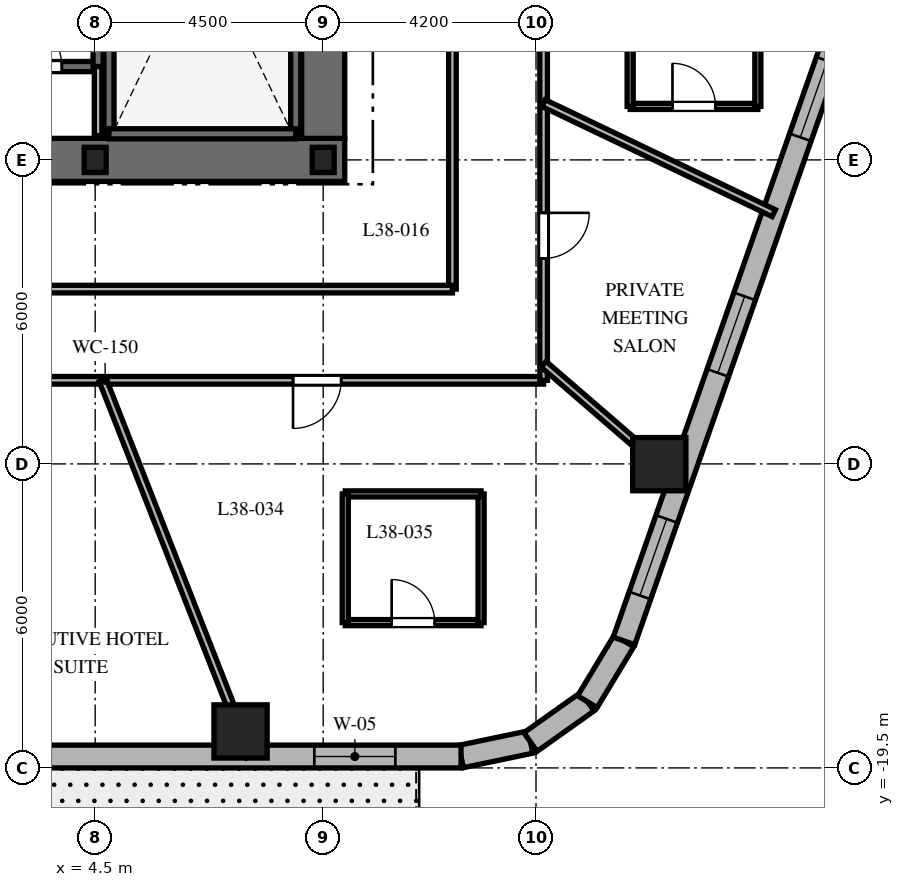
"""IFC4 building model, lengths in metres.
Left out: names, types, materials, properties, quantities, classifications, styles, units other than length and angle.
Written with IfcOpenShell. Run it as: python <this file> out.ifc"""

import sys

from ifc_helpers import new_model, si_unit, direction, frame, frame_2d, origin, origin_2d, place, context, subcontext, project, spatial, rectangle, i_section, extrude, element, fill, save


model = new_model("IFC4")
c1 = context("Model", 3, precision=1e-05, world=origin(), true_north=direction((0.0, 1.0)))
c2 = subcontext(c1, "Body", "Model", "MODEL_VIEW")
j1 = project(units=[si_unit("LENGTHUNIT", "METRE"), si_unit("PLANEANGLEUNIT", "RADIAN")], contexts=[c1])
p1 = place(None, origin())
s1 = spatial("IfcSite", under=j1, at=p1, CompositionType="ELEMENT")
p2 = place(p1, origin())
s2 = spatial("IfcBuilding", under=s1, at=p2, CompositionType="ELEMENT")
p3 = place(p2, frame((0.0, 0.0, 155.4)))
s3 = spatial("IfcBuildingStorey", under=s2, at=p3, CompositionType="ELEMENT", Elevation=155.4)
p4 = place(p3, frame((-9.425, -7.5, 0.0), z_axis=(0.0, 0.0, 1.0), x_axis=(1.0, 0.0, 0.0)))
e1 = element("IfcWall", 1, at=p4, inside=s3, PredefinedType="SHEAR", context=c2, shape_type="SweptSolid", body=[
    extrude(rectangle(XDim=18.85, YDim=0.85, at=frame_2d((9.425, 0.0))), origin(), (0.0, 0.0, 1.0), 3.7),
])
p5 = place(p4, frame((9.475, 0.0, 0.0)))
e2 = element("IfcOpeningElement", 2, at=p5, cuts=e1, PredefinedType="OPENING", context=c2, shape_type="SweptSolid", body=[
    extrude(rectangle(XDim=1.0, YDim=2.15, at=frame_2d((0.5, 1.075))), frame((0.0, 0.435, 0.0), z_axis=(0.0, -1.0, 0.0), x_axis=(1.0, 0.0, 0.0)), (0.0, 0.0, 1.0), 0.87),
])
p6 = place(p3, frame((9.0, -7.075, 0.0), z_axis=(0.0, 0.0, 1.0), x_axis=(0.0, 1.0, 0.0)))
e3 = element("IfcWall", 3, at=p6, inside=s3, PredefinedType="SHEAR", context=c2, shape_type="SweptSolid", body=[
    extrude(rectangle(XDim=14.15, YDim=0.85, at=frame_2d((7.075, 0.0))), origin(), (0.0, 0.0, 1.0), 3.7),
])
p7 = place(p6, frame((10.2, 0.0, 0.0)))
e4 = element("IfcOpeningElement", 4, at=p7, cuts=e3, PredefinedType="OPENING", context=c2, shape_type="SweptSolid", body=[
    extrude(rectangle(XDim=1.05, YDim=2.15, at=frame_2d((0.525, 1.075))), frame((0.0, 0.435, 0.0), z_axis=(0.0, -1.0, 0.0), x_axis=(1.0, 0.0, 0.0)), (0.0, 0.0, 1.0), 0.87),
])
for number, where, z_axis, x_axis in (
    (5, (4.772, -6.985, 0.0), (0.0, 0.0, 1.0), (0.0, 1.0, 0.0)),
    (6, (8.458, -6.985, 0.0), (0.0, 0.0, 1.0), (0.0, 1.0, 0.0)),
):
    element("IfcWall", number, at=place(p3, frame(where, z_axis=z_axis, x_axis=x_axis)), inside=s3, PredefinedType="SHEAR", context=c2, shape_type="SweptSolid", body=[
        extrude(rectangle(XDim=9.143, YDim=0.2, at=frame_2d((4.572, 0.0))), origin(), (0.0, 0.0, 1.0), 3.7),
    ])
p8 = place(p3, frame((4.772, -6.985, 0.0), z_axis=(0.0, 0.0, 1.0), x_axis=(1.0, 0.0, 0.0)))
e7 = element("IfcWall", 7, at=p8, inside=s3, PredefinedType="SHEAR", context=c2, shape_type="SweptSolid", body=[
    extrude(rectangle(XDim=3.686, YDim=0.2, at=frame_2d((1.843, 0.0))), origin(), (0.0, 0.0, 1.0), 3.7),
])
p9 = place(p3, frame((-4.608, -5.658, 0.0), z_axis=(0.0, 0.0, 1.0), x_axis=(1.0, 0.0, 0.0)))
e8 = element("IfcWall", 8, at=p9, inside=s3, PredefinedType="SHEAR", context=c2, shape_type="SweptSolid", body=[
    extrude(rectangle(XDim=9.166, YDim=0.2, at=frame_2d((4.583, 0.0))), origin(), (0.0, 0.0, 1.0), 3.7),
])
p10 = place(p9, frame((7.45, 0.0, 0.0)))
e9 = element("IfcOpeningElement", 9, at=p10, cuts=e8, PredefinedType="OPENING", context=c2, shape_type="SweptSolid", body=[
    extrude(rectangle(XDim=1.0, YDim=2.15, at=frame_2d((0.5, 1.075))), frame((0.0, 0.11, 0.0), z_axis=(0.0, -1.0, 0.0), x_axis=(1.0, 0.0, 0.0)), (0.0, 0.0, 1.0), 0.22),
])
p11 = place(p3, frame((4.558, -5.658, 0.0), z_axis=(0.0, 0.0, 1.0), x_axis=(0.0, 1.0, 0.0)))
e10 = element("IfcWall", 10, at=p11, inside=s3, PredefinedType="SHEAR", context=c2, shape_type="SweptSolid", body=[
    extrude(rectangle(XDim=3.686, YDim=0.2, at=frame_2d((1.843, 0.0))), origin(), (0.0, 0.0, 1.0), 3.7),
])
for number, where, z_axis, x_axis in (
    (11, (4.5, -7.5, 0.0), (0.0, 0.0, 1.0), (1.0, 0.0, 0.0)),
    (12, (9.0, -7.5, 0.0), (0.0, 0.0, 1.0), (1.0, 0.0, 0.0)),
):
    element("IfcColumn", number, at=place(p3, frame(where, z_axis=z_axis, x_axis=x_axis)), inside=s3, PredefinedType="COLUMN", context=c2, shape_type="SweptSolid", body=[
        extrude(i_section(OverallWidth=0.432, OverallDepth=0.498, WebThickness=0.056, FlangeThickness=0.089, at=origin_2d()), origin(), (0.0, 0.0, 1.0), 3.7),
    ])
for number, where, z_axis, x_axis in (
    (13, (7.369, -18.78, 0.0), (0.0, 0.0, 1.0), (1.0, 0.0, 0.0)),
    (14, (15.633, -13.505, 0.0), (0.0, 0.0, 1.0), (1.0, 0.0, 0.0)),
):
    element("IfcColumn", number, at=place(p3, frame(where, z_axis=z_axis, x_axis=x_axis)), inside=s3, PredefinedType="COLUMN", context=c2, shape_type="SweptSolid", body=[
        extrude(rectangle(XDim=1.05, YDim=1.05, at=origin_2d()), origin(), (0.0, 0.0, 1.0), 3.7),
    ])
p12 = place(p3, frame((11.72, -19.275, 0.0), z_axis=(0.0, 0.0, 1.0), x_axis=(0.97893106758, 0.204191001093, 0.0)))
e15 = element("IfcWall", 15, at=p12, inside=s3, PredefinedType="SOLIDWALL", context=c2, shape_type="SweptSolid", body=[
    extrude(rectangle(XDim=1.4, YDim=0.45, at=frame_2d((0.7, 0.0))), origin(), (0.0, 0.0, 1.0), 3.4),
])
p13 = place(p3, frame((13.091, -18.989, 0.0), z_axis=(0.0, 0.0, 1.0), x_axis=(0.815574637848, 0.578651890258, 0.0)))
e16 = element("IfcWall", 16, at=p13, inside=s3, PredefinedType="SOLIDWALL", context=c2, shape_type="SweptSolid", body=[
    extrude(rectangle(XDim=1.377, YDim=0.45, at=frame_2d((0.688, 0.0))), origin(), (0.0, 0.0, 1.0), 3.4),
])
p14 = place(p3, frame((14.214, -18.192, 0.0), z_axis=(0.0, 0.0, 1.0), x_axis=(0.516340945502, 0.856383108193, 0.0)))
e17 = element("IfcWall", 17, at=p14, inside=s3, PredefinedType="SOLIDWALL", context=c2, shape_type="SweptSolid", body=[
    extrude(rectangle(XDim=1.4, YDim=0.45, at=frame_2d((0.7, 0.0))), origin(), (0.0, 0.0, 1.0), 3.4),
])
p15 = place(p3, frame((-10.108, -19.275, 0.0), z_axis=(0.0, 0.0, 1.0), x_axis=(1.0, 0.0, 0.0)))
e18 = element("IfcWall", 18, at=p15, inside=s3, PredefinedType="SOLIDWALL", context=c2, shape_type="SweptSolid", body=[
    extrude(rectangle(XDim=21.829, YDim=0.45, at=frame_2d((10.915, 0.0))), origin(), (0.0, 0.0, 1.0), 3.4),
])
p16 = place(p15, frame((5.503, 0.0, 0.0)))
e19 = element("IfcOpeningElement", 19, at=p16, cuts=e18, PredefinedType="OPENING", context=c2, shape_type="SweptSolid", body=[
    extrude(rectangle(XDim=1.0, YDim=2.15, at=frame_2d((0.5, 1.075))), frame((0.0, 0.235, 0.0), z_axis=(0.0, -1.0, 0.0), x_axis=(1.0, 0.0, 0.0)), (0.0, 0.0, 1.0), 0.47),
])
p17 = place(p15, frame((1.297, 0.0, 0.8)))
e20 = element("IfcOpeningElement", 20, at=p17, cuts=e18, PredefinedType="OPENING", context=c2, shape_type="SweptSolid", body=[
    extrude(rectangle(XDim=1.6, YDim=1.75, at=frame_2d((0.8, 0.875))), frame((0.0, 0.235, 0.0), z_axis=(0.0, -1.0, 0.0), x_axis=(1.0, 0.0, 0.0)), (0.0, 0.0, 1.0), 0.47),
])
p18 = place(p15, frame((10.115, 0.0, 0.8)))
e21 = element("IfcOpeningElement", 21, at=p18, cuts=e18, PredefinedType="OPENING", context=c2, shape_type="SweptSolid", body=[
    extrude(rectangle(XDim=1.6, YDim=1.75, at=frame_2d((0.8, 0.875))), frame((0.0, 0.235, 0.0), z_axis=(0.0, -1.0, 0.0), x_axis=(1.0, 0.0, 0.0)), (0.0, 0.0, 1.0), 0.47),
])
p19 = place(p15, frame((18.933, 0.0, 0.8)))
e22 = element("IfcOpeningElement", 22, at=p19, cuts=e18, PredefinedType="OPENING", context=c2, shape_type="SweptSolid", body=[
    extrude(rectangle(XDim=1.6, YDim=1.75, at=frame_2d((0.8, 0.875))), frame((0.0, 0.235, 0.0), z_axis=(0.0, -1.0, 0.0), x_axis=(1.0, 0.0, 0.0)), (0.0, 0.0, 1.0), 0.47),
])
p20 = place(p3, frame((14.937, -16.993, 0.0), z_axis=(0.0, 0.0, 1.0), x_axis=(0.330431575061, 0.943829949834, 0.0)))
e23 = element("IfcWall", 23, at=p20, inside=s3, PredefinedType="SOLIDWALL", context=c2, shape_type="SweptSolid", body=[
    extrude(rectangle(XDim=17.689, YDim=0.45, at=frame_2d((8.844, 0.0))), origin(), (0.0, 0.0, 1.0), 3.4),
])
p21 = place(p20, frame((0.95, 0.0, 0.8)))
e24 = element("IfcOpeningElement", 24, at=p21, cuts=e23, PredefinedType="OPENING", context=c2, shape_type="SweptSolid", body=[
    extrude(rectangle(XDim=1.6, YDim=1.75, at=frame_2d((0.8, 0.875))), frame((0.0, 0.235, 0.0), z_axis=(0.0, -1.0, 0.0), x_axis=(1.0, 0.0, 0.0)), (0.0, 0.0, 1.0), 0.47),
])
p22 = place(p20, frame((5.605, 0.0, 0.8)))
e25 = element("IfcOpeningElement", 25, at=p22, cuts=e23, PredefinedType="OPENING", context=c2, shape_type="SweptSolid", body=[
    extrude(rectangle(XDim=1.6, YDim=1.75, at=frame_2d((0.8, 0.875))), frame((0.0, 0.235, 0.0), z_axis=(0.0, -1.0, 0.0), x_axis=(1.0, 0.0, 0.0)), (0.0, 0.0, 1.0), 0.47),
])
p23 = place(p20, frame((10.531, 0.0, 0.8)))
e26 = element("IfcOpeningElement", 26, at=p23, cuts=e23, PredefinedType="OPENING", context=c2, shape_type="SweptSolid", body=[
    extrude(rectangle(XDim=1.6, YDim=1.75, at=frame_2d((0.8, 0.875))), frame((0.0, 0.235, 0.0), z_axis=(0.0, -1.0, 0.0), x_axis=(1.0, 0.0, 0.0)), (0.0, 0.0, 1.0), 0.47),
])
p24 = place(p20, frame((15.084, 0.0, 0.8)))
e27 = element("IfcOpeningElement", 27, at=p24, cuts=e23, PredefinedType="OPENING", context=c2, shape_type="SweptSolid", body=[
    extrude(rectangle(XDim=1.6, YDim=1.75, at=frame_2d((0.8, 0.875))), frame((0.0, 0.235, 0.0), z_axis=(0.0, -1.0, 0.0), x_axis=(1.0, 0.0, 0.0)), (0.0, 0.0, 1.0), 0.47),
])
p25 = place(p3, frame((4.558, -7.02, 0.0), z_axis=(0.0, 0.0, 1.0), x_axis=(0.0, 1.0, 0.0)))
e28 = element("IfcWall", 28, at=p25, inside=s3, PredefinedType="PARTITIONING", context=c2, shape_type="SweptSolid", body=[
    extrude(rectangle(XDim=1.362, YDim=0.15, at=frame_2d((0.681, 0.0))), origin(), (0.0, 0.0, 1.0), 3.4),
])
p26 = place(p3, frame((13.35, -11.85, 0.0), z_axis=(0.0, 0.0, 1.0), x_axis=(-1.0, 0.0, 0.0)))
e29 = element("IfcWall", 29, at=p26, inside=s3, PredefinedType="PARTITIONING", context=c2, shape_type="SweptSolid", body=[
    extrude(rectangle(XDim=26.7, YDim=0.15, at=frame_2d((13.35, 0.0))), origin(), (0.0, 0.0, 1.0), 2.84),
])
p27 = place(p26, frame((20.682, 0.0, 0.0)))
e30 = element("IfcOpeningElement", 30, at=p27, cuts=e29, PredefinedType="OPENING", context=c2, shape_type="SweptSolid", body=[
    extrude(rectangle(XDim=0.95, YDim=2.03, at=frame_2d((0.475, 1.015))), frame((0.0, 0.085, 0.0), z_axis=(0.0, -1.0, 0.0), x_axis=(1.0, 0.0, 0.0)), (0.0, 0.0, 1.0), 0.17),
])
p28 = place(p26, frame((12.362, 0.0, 0.0)))
e31 = element("IfcOpeningElement", 31, at=p28, cuts=e29, PredefinedType="OPENING", context=c2, shape_type="SweptSolid", body=[
    extrude(rectangle(XDim=0.95, YDim=2.03, at=frame_2d((0.475, 1.015))), frame((0.0, 0.085, 0.0), z_axis=(0.0, -1.0, 0.0), x_axis=(1.0, 0.0, 0.0)), (0.0, 0.0, 1.0), 0.17),
])
p29 = place(p26, frame((3.995, 0.0, 0.0)))
e32 = element("IfcOpeningElement", 32, at=p29, cuts=e29, PredefinedType="OPENING", context=c2, shape_type="SweptSolid", body=[
    extrude(rectangle(XDim=0.95, YDim=2.03, at=frame_2d((0.475, 1.015))), frame((0.0, 0.085, 0.0), z_axis=(0.0, -1.0, 0.0), x_axis=(1.0, 0.0, 0.0)), (0.0, 0.0, 1.0), 0.17),
])
p30 = place(p3, frame((13.35, 11.85, 0.0), z_axis=(0.0, 0.0, 1.0), x_axis=(0.0, -1.0, 0.0)))
e33 = element("IfcWall", 33, at=p30, inside=s3, PredefinedType="PARTITIONING", context=c2, shape_type="SweptSolid", body=[
    extrude(rectangle(XDim=23.7, YDim=0.15, at=frame_2d((11.85, 0.0))), origin(), (0.0, 0.0, 1.0), 2.84),
])
p31 = place(p30, frame((3.765, 0.0, 0.0)))
e34 = element("IfcOpeningElement", 34, at=p31, cuts=e33, PredefinedType="OPENING", context=c2, shape_type="SweptSolid", body=[
    extrude(rectangle(XDim=0.9, YDim=2.03, at=frame_2d((0.45, 1.015))), frame((0.0, 0.085, 0.0), z_axis=(0.0, -1.0, 0.0), x_axis=(1.0, 0.0, 0.0)), (0.0, 0.0, 1.0), 0.17),
])
p32 = place(p30, frame((20.395, 0.0, 0.0)))
e35 = element("IfcOpeningElement", 35, at=p32, cuts=e33, PredefinedType="OPENING", context=c2, shape_type="SweptSolid", body=[
    extrude(rectangle(XDim=0.9, YDim=2.03, at=frame_2d((0.45, 1.015))), frame((0.0, 0.085, 0.0), z_axis=(0.0, -1.0, 0.0), x_axis=(1.0, 0.0, 0.0)), (0.0, 0.0, 1.0), 0.17),
])
p33 = place(p30, frame((15.787, 0.0, 0.0)))
e36 = element("IfcOpeningElement", 36, at=p33, cuts=e33, PredefinedType="OPENING", context=c2, shape_type="SweptSolid", body=[
    extrude(rectangle(XDim=0.95, YDim=2.03, at=frame_2d((0.475, 1.015))), frame((0.0, 0.085, 0.0), z_axis=(0.0, -1.0, 0.0), x_axis=(1.0, 0.0, 0.0)), (0.0, 0.0, 1.0), 0.17),
])
p34 = place(p30, frame((10.751, 0.0, 0.0)))
e37 = element("IfcOpeningElement", 37, at=p34, cuts=e33, PredefinedType="OPENING", context=c2, shape_type="SweptSolid", body=[
    extrude(rectangle(XDim=0.95, YDim=2.03, at=frame_2d((0.475, 1.015))), frame((0.0, 0.085, 0.0), z_axis=(0.0, -1.0, 0.0), x_axis=(1.0, 0.0, 0.0)), (0.0, 0.0, 1.0), 0.17),
])
p35 = place(p3, frame((11.55, -10.05, 0.0), z_axis=(0.0, 0.0, 1.0), x_axis=(0.0, 1.0, 0.0)))
e38 = element("IfcWall", 38, at=p35, inside=s3, PredefinedType="PARTITIONING", context=c2, shape_type="SweptSolid", body=[
    extrude(rectangle(XDim=12.75, YDim=0.15, at=frame_2d((6.375, 0.0))), origin(), (0.0, 0.0, 1.0), 2.84),
])
p36 = place(p35, frame((5.95, 0.0, 0.0)))
e39 = element("IfcOpeningElement", 39, at=p36, cuts=e38, PredefinedType="OPENING", context=c2, shape_type="SweptSolid", body=[
    extrude(rectangle(XDim=0.85, YDim=2.03, at=frame_2d((0.425, 1.015))), frame((0.0, 0.085, 0.0), z_axis=(0.0, -1.0, 0.0), x_axis=(1.0, 0.0, 0.0)), (0.0, 0.0, 1.0), 0.17),
])
p37 = place(p3, frame((1.9, -10.05, 0.0), z_axis=(0.0, 0.0, 1.0), x_axis=(1.0, 0.0, 0.0)))
e40 = element("IfcWall", 40, at=p37, inside=s3, PredefinedType="PARTITIONING", context=c2, shape_type="SweptSolid", body=[
    extrude(rectangle(XDim=9.65, YDim=0.15, at=frame_2d((4.825, 0.0))), origin(), (0.0, 0.0, 1.0), 2.84),
])
p38 = place(p3, frame((4.65, -11.85, 0.0), z_axis=(0.0, 0.0, 1.0), x_axis=(0.365265947993, -0.930903210456, 0.0)))
e41 = element("IfcWall", 41, at=p38, inside=s3, PredefinedType="PARTITIONING", context=c2, shape_type="SweptSolid", body=[
    extrude(rectangle(XDim=7.976, YDim=0.15, at=frame_2d((3.988, 0.0))), origin(), (0.0, 0.0, 1.0), 2.64),
])
p39 = place(p3, frame((13.35, -11.533, 0.0), z_axis=(0.0, 0.0, 1.0), x_axis=(0.756711647314, -0.65374879183, 0.0)))
e42 = element("IfcWall", 42, at=p39, inside=s3, PredefinedType="PARTITIONING", context=c2, shape_type="SweptSolid", body=[
    extrude(rectangle(XDim=3.55, YDim=0.15, at=frame_2d((1.775, 0.0))), origin(), (0.0, 0.0, 1.0), 2.64),
])
p40 = place(p3, frame((13.35, -6.38, 0.0), z_axis=(0.0, 0.0, 1.0), x_axis=(0.90225728206, -0.431198094812, 0.0)))
e43 = element("IfcWall", 43, at=p40, inside=s3, PredefinedType="PARTITIONING", context=c2, shape_type="SweptSolid", body=[
    extrude(rectangle(XDim=5.035, YDim=0.15, at=frame_2d((2.517, 0.0))), origin(), (0.0, 0.0, 1.0), 2.64),
])
p41 = place(p3, frame((9.436, -16.632, 0.0), z_axis=(0.0, 0.0, 1.0), x_axis=(1.0, 0.0, 0.0)))
e44 = element("IfcWall", 44, at=p41, inside=s3, PredefinedType="PARTITIONING", context=c2, shape_type="SweptSolid", body=[
    extrude(rectangle(XDim=2.68, YDim=0.12, at=frame_2d((1.34, 0.0))), origin(), (0.0, 0.0, 1.0), 2.64),
])
p42 = place(p41, frame((0.915, 0.0, 0.0)))
e45 = element("IfcOpeningElement", 45, at=p42, cuts=e44, PredefinedType="OPENING", context=c2, shape_type="SweptSolid", body=[
    extrude(rectangle(XDim=0.85, YDim=2.03, at=frame_2d((0.425, 1.015))), frame((0.0, 0.07, 0.0), z_axis=(0.0, -1.0, 0.0), x_axis=(1.0, 0.0, 0.0)), (0.0, 0.0, 1.0), 0.14),
])
p43 = place(p3, frame((12.116, -16.632, 0.0), z_axis=(0.0, 0.0, 1.0), x_axis=(0.0, 1.0, 0.0)))
e46 = element("IfcWall", 46, at=p43, inside=s3, PredefinedType="PARTITIONING", context=c2, shape_type="SweptSolid", body=[
    extrude(rectangle(XDim=2.54, YDim=0.12, at=frame_2d((1.27, 0.0))), origin(), (0.0, 0.0, 1.0), 2.64),
])
p44 = place(p3, frame((12.116, -14.092, 0.0), z_axis=(0.0, 0.0, 1.0), x_axis=(-1.0, 0.0, 0.0)))
e47 = element("IfcWall", 47, at=p44, inside=s3, PredefinedType="PARTITIONING", context=c2, shape_type="SweptSolid", body=[
    extrude(rectangle(XDim=2.68, YDim=0.12, at=frame_2d((1.34, 0.0))), origin(), (0.0, 0.0, 1.0), 2.927),
])
p45 = place(p3, frame((9.436, -14.092, 0.0), z_axis=(0.0, 0.0, 1.0), x_axis=(0.0, -1.0, 0.0)))
e48 = element("IfcWall", 48, at=p45, inside=s3, PredefinedType="PARTITIONING", context=c2, shape_type="SweptSolid", body=[
    extrude(rectangle(XDim=2.54, YDim=0.12, at=frame_2d((1.27, 0.0))), origin(), (0.0, 0.0, 1.0), 2.927),
])
p46 = place(p3, frame((15.058, -6.444, 0.0), z_axis=(0.0, 0.0, 1.0), x_axis=(1.0, 0.0, 0.0)))
e49 = element("IfcWall", 49, at=p46, inside=s3, PredefinedType="PARTITIONING", context=c2, shape_type="SweptSolid", body=[
    extrude(rectangle(XDim=2.52, YDim=0.12, at=frame_2d((1.26, 0.0))), origin(), (0.0, 0.0, 1.0), 2.972),
])
p47 = place(p46, frame((0.835, 0.0, 0.0)))
e50 = element("IfcOpeningElement", 50, at=p47, cuts=e49, PredefinedType="OPENING", context=c2, shape_type="SweptSolid", body=[
    extrude(rectangle(XDim=0.85, YDim=2.03, at=frame_2d((0.425, 1.015))), frame((0.0, 0.07, 0.0), z_axis=(0.0, -1.0, 0.0), x_axis=(1.0, 0.0, 0.0)), (0.0, 0.0, 1.0), 0.14),
])
for number, where, z_axis, x_axis in (
    (51, (17.578, -6.444, 0.0), (0.0, 0.0, 1.0), (0.0, 1.0, 0.0)),
    (52, (15.058, -3.764, 0.0), (0.0, 0.0, 1.0), (0.0, -1.0, 0.0)),
):
    element("IfcWall", number, at=place(p3, frame(where, z_axis=z_axis, x_axis=x_axis)), inside=s3, PredefinedType="PARTITIONING", context=c2, shape_type="SweptSolid", body=[
        extrude(rectangle(XDim=2.68, YDim=0.12, at=frame_2d((1.34, 0.0))), origin(), (0.0, 0.0, 1.0), 2.84),
    ])
p48 = place(p19, origin())
e53 = element("IfcWindow", 53, at=p48, inside=s3, PartitioningType="SINGLE_PANEL", PredefinedType="WINDOW", context=c2, shape_type="SweptSolid", body=[
    extrude(rectangle(XDim=1.6, YDim=1.75, at=frame_2d((0.8, 0.875))), frame((0.0, 0.03, 0.0), z_axis=(0.0, -1.0, 0.0), x_axis=(1.0, 0.0, 0.0)), (0.0, 0.0, 1.0), 0.06),
])
fill(e22, e53)
p49 = place(p21, origin())
e54 = element("IfcWindow", 54, at=p49, inside=s3, PartitioningType="SINGLE_PANEL", PredefinedType="WINDOW", context=c2, shape_type="SweptSolid", body=[
    extrude(rectangle(XDim=1.6, YDim=1.75, at=frame_2d((0.8, 0.875))), frame((0.0, 0.03, 0.0), z_axis=(0.0, -1.0, 0.0), x_axis=(1.0, 0.0, 0.0)), (0.0, 0.0, 1.0), 0.06),
])
fill(e24, e54)
p50 = place(p22, origin())
e55 = element("IfcWindow", 55, at=p50, inside=s3, PartitioningType="SINGLE_PANEL", PredefinedType="WINDOW", context=c2, shape_type="SweptSolid", body=[
    extrude(rectangle(XDim=1.6, YDim=1.75, at=frame_2d((0.8, 0.875))), frame((0.0, 0.03, 0.0), z_axis=(0.0, -1.0, 0.0), x_axis=(1.0, 0.0, 0.0)), (0.0, 0.0, 1.0), 0.06),
])
fill(e25, e55)
p51 = place(p23, origin())
e56 = element("IfcWindow", 56, at=p51, inside=s3, PartitioningType="SINGLE_PANEL", PredefinedType="WINDOW", context=c2, shape_type="SweptSolid", body=[
    extrude(rectangle(XDim=1.6, YDim=1.75, at=frame_2d((0.8, 0.875))), frame((0.0, 0.03, 0.0), z_axis=(0.0, -1.0, 0.0), x_axis=(1.0, 0.0, 0.0)), (0.0, 0.0, 1.0), 0.06),
])
fill(e26, e56)
p52 = place(p10, origin())
e57 = element("IfcDoor", 57, at=p52, inside=s3, OperationType="SINGLE_SWING_LEFT", PredefinedType="DOOR", context=c2, shape_type="SweptSolid", body=[
    extrude(rectangle(XDim=1.0, YDim=2.15, at=frame_2d((0.5, 1.075))), frame((0.0, 0.025, 0.0), z_axis=(0.0, -1.0, 0.0), x_axis=(1.0, 0.0, 0.0)), (0.0, 0.0, 1.0), 0.05),
])
fill(e9, e57)
p53 = place(p29, origin())
e58 = element("IfcDoor", 58, at=p53, inside=s3, OperationType="SINGLE_SWING_RIGHT", PredefinedType="DOOR", context=c2, shape_type="SweptSolid", body=[
    extrude(rectangle(XDim=0.95, YDim=2.03, at=frame_2d((0.475, 1.015))), frame((0.0, 0.025, 0.0), z_axis=(0.0, -1.0, 0.0), x_axis=(1.0, 0.0, 0.0)), (0.0, 0.0, 1.0), 0.05),
])
fill(e32, e58)
p54 = place(p42, origin())
e59 = element("IfcDoor", 59, at=p54, inside=s3, OperationType="SINGLE_SWING_LEFT", PredefinedType="DOOR", context=c2, shape_type="SweptSolid", body=[
    extrude(rectangle(XDim=0.85, YDim=2.03, at=frame_2d((0.425, 1.015))), frame((0.0, 0.025, 0.0), z_axis=(0.0, -1.0, 0.0), x_axis=(1.0, 0.0, 0.0)), (0.0, 0.0, 1.0), 0.05),
])
fill(e45, e59)
p55 = place(p32, origin())
e60 = element("IfcDoor", 60, at=p55, inside=s3, OperationType="SINGLE_SWING_LEFT", PredefinedType="DOOR", context=c2, shape_type="SweptSolid", body=[
    extrude(rectangle(XDim=0.9, YDim=2.03, at=frame_2d((0.45, 1.015))), frame((0.0, 0.025, 0.0), z_axis=(0.0, -1.0, 0.0), x_axis=(1.0, 0.0, 0.0)), (0.0, 0.0, 1.0), 0.05),
])
fill(e35, e60)
p56 = place(p47, origin())
e61 = element("IfcDoor", 61, at=p56, inside=s3, OperationType="SINGLE_SWING_LEFT", PredefinedType="DOOR", context=c2, shape_type="SweptSolid", body=[
    extrude(rectangle(XDim=0.85, YDim=2.03, at=frame_2d((0.425, 1.015))), frame((0.0, 0.025, 0.0), z_axis=(0.0, -1.0, 0.0), x_axis=(1.0, 0.0, 0.0)), (0.0, 0.0, 1.0), 0.05),
])
fill(e50, e61)
save(model, sys.argv[1])
